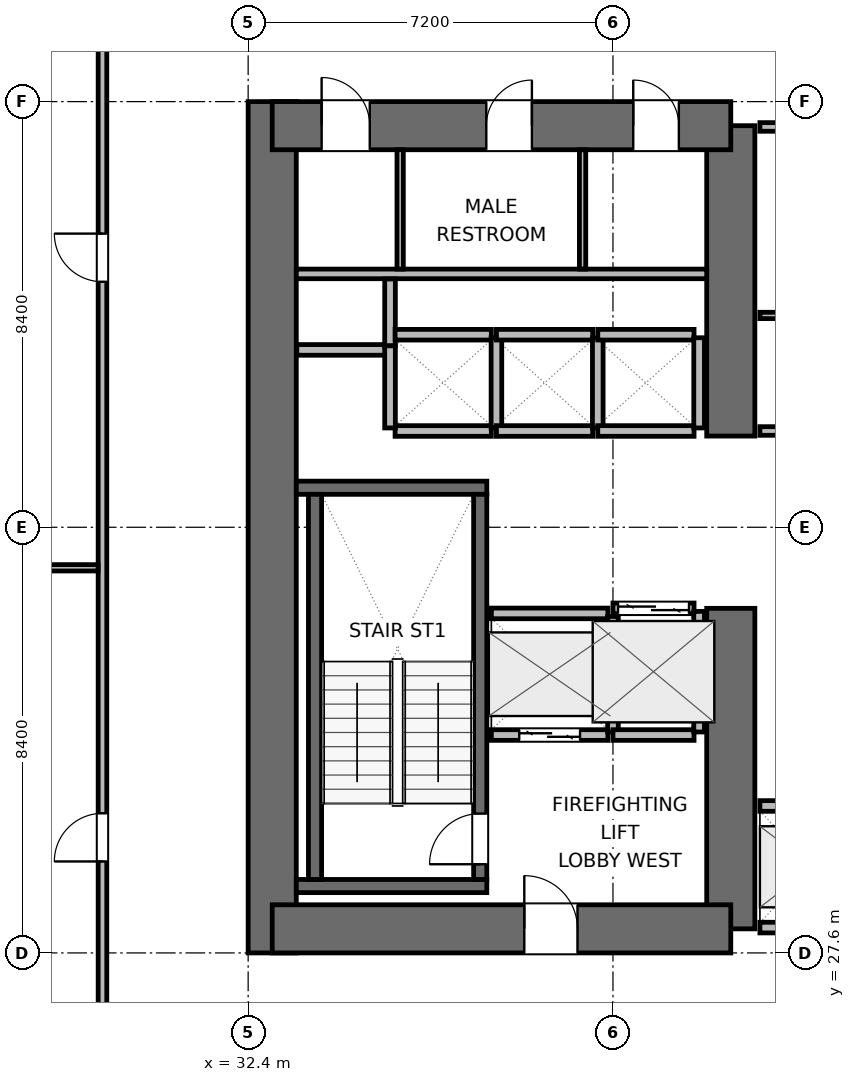
"""IFC4 building model, lengths in metres.
Left out: names, types, materials, properties, quantities, classifications, styles, units other than length and angle.
Written with IfcOpenShell. Run it as: python <this file> out.ifc"""

import sys

from ifc_helpers import new_model, si_unit, direction, frame, frame_2d, origin, place, context, subcontext, project, spatial, rectangle, extrude, element, fill, save


model = new_model("IFC4")
c1 = context("Model", 3, precision=1e-05, world=origin(), true_north=direction((0.0, 1.0)))
c2 = subcontext(c1, "Body", "Model", "MODEL_VIEW")
j1 = project(units=[si_unit("LENGTHUNIT", "METRE"), si_unit("PLANEANGLEUNIT", "RADIAN")], contexts=[c1])
p1 = place(None, origin())
s1 = spatial("IfcSite", under=j1, at=p1, CompositionType="ELEMENT")
p2 = place(p1, origin())
s2 = spatial("IfcBuilding", under=s1, at=p2, CompositionType="ELEMENT")
p3 = place(p2, frame((0.0, 0.0, 60.6)))
s3 = spatial("IfcBuildingStorey", under=s2, at=p3, CompositionType="ELEMENT", Elevation=60.6)
p4 = place(p3, frame((32.875, 27.6, 0.0), z_axis=(0.0, 0.0, 1.0), x_axis=(0.0, 1.0, 0.0)))
e1 = element("IfcWall", 1, at=p4, inside=s3, PredefinedType="SHEAR", context=c2, shape_type="SweptSolid", body=[
    extrude(rectangle(XDim=16.8, YDim=0.95, at=frame_2d((8.4, 0.0))), origin(), (0.0, 0.0, 1.0), 3.9),
])
p5 = place(p3, frame((41.925, 28.075, 0.0), z_axis=(0.0, 0.0, 1.0), x_axis=(0.0, 1.0, 0.0)))
e2 = element("IfcWall", 2, at=p5, inside=s3, PredefinedType="SHEAR", context=c2, shape_type="SweptSolid", body=[
    extrude(rectangle(XDim=6.325, YDim=0.95, at=frame_2d((3.163, 0.0))), origin(), (0.0, 0.0, 1.0), 3.9),
])
p6 = place(p3, frame((41.925, 37.8, 0.0), z_axis=(0.0, 0.0, 1.0), x_axis=(0.0, 1.0, 0.0)))
e3 = element("IfcWall", 3, at=p6, inside=s3, PredefinedType="SHEAR", context=c2, shape_type="SweptSolid", body=[
    extrude(rectangle(XDim=6.125, YDim=0.95, at=frame_2d((3.062, 0.0))), origin(), (0.0, 0.0, 1.0), 3.9),
])
p7 = place(p3, frame((32.875, 28.075, 0.0), z_axis=(0.0, 0.0, 1.0), x_axis=(1.0, 0.0, 0.0)))
e4 = element("IfcWall", 4, at=p7, inside=s3, PredefinedType="SHEAR", context=c2, shape_type="SweptSolid", body=[
    extrude(rectangle(XDim=9.05, YDim=0.95, at=frame_2d((4.525, 0.0))), origin(), (0.0, 0.0, 1.0), 3.9),
])
p8 = place(p7, frame((4.975, 0.0, 0.0)))
e5 = element("IfcOpeningElement", 5, at=p8, cuts=e4, PredefinedType="OPENING", context=c2, shape_type="SweptSolid", body=[
    extrude(rectangle(XDim=1.05, YDim=2.04, at=frame_2d((0.525, 1.02))), frame((0.0, 0.485, 0.0), z_axis=(0.0, -1.0, 0.0), x_axis=(1.0, 0.0, 0.0)), (0.0, 0.0, 1.0), 0.97),
])
p9 = place(p3, frame((32.875, 43.925, 0.0), z_axis=(0.0, 0.0, 1.0), x_axis=(1.0, 0.0, 0.0)))
e6 = element("IfcWall", 6, at=p9, inside=s3, PredefinedType="SHEAR", context=c2, shape_type="SweptSolid", body=[
    extrude(rectangle(XDim=9.05, YDim=0.95, at=frame_2d((4.525, 0.0))), origin(), (0.0, 0.0, 1.0), 3.9),
])
p10 = place(p9, frame((0.975, 0.0, 0.0)))
e7 = element("IfcOpeningElement", 7, at=p10, cuts=e6, PredefinedType="OPENING", context=c2, shape_type="SweptSolid", body=[
    extrude(rectangle(XDim=0.95, YDim=2.04, at=frame_2d((0.475, 1.02))), frame((0.0, 0.485, 0.0), z_axis=(0.0, -1.0, 0.0), x_axis=(1.0, 0.0, 0.0)), (0.0, 0.0, 1.0), 0.97),
])
p11 = place(p9, frame((4.225, 0.0, 0.0)))
e8 = element("IfcOpeningElement", 8, at=p11, cuts=e6, PredefinedType="OPENING", context=c2, shape_type="SweptSolid", body=[
    extrude(rectangle(XDim=0.9, YDim=2.02, at=frame_2d((0.45, 1.01))), frame((0.0, 0.485, 0.0), z_axis=(0.0, -1.0, 0.0), x_axis=(1.0, 0.0, 0.0)), (0.0, 0.0, 1.0), 0.97),
])
p12 = place(p9, frame((7.125, 0.0, 0.0)))
e9 = element("IfcOpeningElement", 9, at=p12, cuts=e6, PredefinedType="OPENING", context=c2, shape_type="SweptSolid", body=[
    extrude(rectangle(XDim=0.9, YDim=2.02, at=frame_2d((0.45, 1.01))), frame((0.0, 0.485, 0.0), z_axis=(0.0, -1.0, 0.0), x_axis=(1.0, 0.0, 0.0)), (0.0, 0.0, 1.0), 0.97),
])
for number, where, z_axis, x_axis in (
    (10, (33.35, 28.92, 0.0), (0.0, 0.0, 1.0), (1.0, 0.0, 0.0)),
    (11, (33.35, 36.78, 0.0), (0.0, 0.0, 1.0), (1.0, 0.0, 0.0)),
):
    element("IfcWall", number, at=place(p3, frame(where, z_axis=z_axis, x_axis=x_axis)), inside=s3, PredefinedType="SHEAR", context=c2, shape_type="SweptSolid", body=[
        extrude(rectangle(XDim=3.76, YDim=0.26, at=frame_2d((1.88, 0.0))), origin(), (0.0, 0.0, 1.0), 3.9),
    ])
p13 = place(p3, frame((33.72, 29.05, 0.0), z_axis=(0.0, 0.0, 1.0), x_axis=(0.0, 1.0, 0.0)))
e12 = element("IfcWall", 12, at=p13, inside=s3, PredefinedType="SHEAR", context=c2, shape_type="SweptSolid", body=[
    extrude(rectangle(XDim=7.6, YDim=0.26, at=frame_2d((3.8, 0.0))), origin(), (0.0, 0.0, 1.0), 3.9),
])
p14 = place(p3, frame((36.98, 29.05, 0.0), z_axis=(0.0, 0.0, 1.0), x_axis=(0.0, 1.0, 0.0)))
e13 = element("IfcWall", 13, at=p14, inside=s3, PredefinedType="SHEAR", context=c2, shape_type="SweptSolid", body=[
    extrude(rectangle(XDim=7.6, YDim=0.26, at=frame_2d((3.8, 0.0))), origin(), (0.0, 0.0, 1.0), 3.9),
])
p15 = place(p14, frame((0.3, 0.0, 0.0)))
e14 = element("IfcOpeningElement", 14, at=p15, cuts=e13, PredefinedType="OPENING", context=c2, shape_type="SweptSolid", body=[
    extrude(rectangle(XDim=1.0, YDim=2.04, at=frame_2d((0.5, 1.02))), frame((0.0, 0.14, 0.0), z_axis=(0.0, -1.0, 0.0), x_axis=(1.0, 0.0, 0.0)), (0.0, 0.0, 1.0), 0.28),
])
p16 = place(p3, frame((33.35, 41.0, 0.0), z_axis=(0.0, 0.0, 1.0), x_axis=(1.0, 0.0, 0.0)))
e15 = element("IfcWall", 15, at=p16, inside=s3, PredefinedType="PLUMBINGWALL", context=c2, shape_type="SweptSolid", body=[
    extrude(rectangle(XDim=8.1, YDim=0.19, at=frame_2d((4.05, 0.0))), origin(), (0.0, 0.0, 1.0), 3.64),
])
for number, where, z_axis, x_axis in (
    (16, (35.4, 41.095, 0.0), (0.0, 0.0, 1.0), (0.0, 1.0, 0.0)),
    (17, (39.0, 41.095, 0.0), (0.0, 0.0, 1.0), (0.0, 1.0, 0.0)),
):
    element("IfcWall", number, at=place(p3, frame(where, z_axis=z_axis, x_axis=x_axis)), inside=s3, PredefinedType="PARTITIONING", context=c2, shape_type="SweptSolid", body=[
        extrude(rectangle(XDim=2.355, YDim=0.125, at=frame_2d((1.177, 0.0))), origin(), (0.0, 0.0, 1.0), 3.64),
    ])
p17 = place(p3, frame((33.36, 39.5, 0.0), z_axis=(0.0, 0.0, 1.0), x_axis=(1.0, 0.0, 0.0)))
e18 = element("IfcWall", 18, at=p17, inside=s3, PredefinedType="PARTITIONING", context=c2, shape_type="SweptSolid", body=[
    extrude(rectangle(XDim=1.86, YDim=0.21, at=frame_2d((0.93, 0.0))), origin(), (0.0, 0.0, 1.0), 3.64),
])
p18 = place(p3, frame((35.2, 39.58, 0.0), z_axis=(0.0, 0.0, 1.0), x_axis=(0.0, 1.0, 0.0)))
e19 = element("IfcWall", 19, at=p18, inside=s3, PredefinedType="PARTITIONING", context=c2, shape_type="SweptSolid", body=[
    extrude(rectangle(XDim=1.32, YDim=0.21, at=frame_2d((0.66, 0.0))), origin(), (0.0, 0.0, 1.0), 3.64),
])
p19 = place(p3, frame((37.2, 31.9, 0.0), z_axis=(0.0, 0.0, 1.0), x_axis=(1.0, 0.0, 0.0)))
e20 = element("IfcWall", 20, at=p19, inside=s3, PredefinedType="PARTITIONING", context=c2, shape_type="SweptSolid", body=[
    extrude(rectangle(XDim=2.3, YDim=0.21, at=frame_2d((1.15, 0.0))), origin(), (0.0, 0.0, 1.0), 3.64),
])
p20 = place(p19, frame((0.55, 0.0, 0.0)))
e21 = element("IfcOpeningElement", 21, at=p20, cuts=e20, PredefinedType="OPENING", context=c2, shape_type="SweptSolid", body=[
    extrude(rectangle(XDim=1.2, YDim=2.04, at=frame_2d((0.6, 1.02))), frame((0.0, 0.115, 0.0), z_axis=(0.0, -1.0, 0.0), x_axis=(1.0, 0.0, 0.0)), (0.0, 0.0, 1.0), 0.23),
])
p21 = place(p3, frame((37.2, 34.3, 0.0), z_axis=(0.0, 0.0, 1.0), x_axis=(1.0, 0.0, 0.0)))
e22 = element("IfcWall", 22, at=p21, inside=s3, PredefinedType="PARTITIONING", context=c2, shape_type="SweptSolid", body=[
    extrude(rectangle(XDim=2.3, YDim=0.21, at=frame_2d((1.15, 0.0))), origin(), (0.0, 0.0, 1.0), 3.64),
])
p22 = place(p3, frame((39.6, 31.96, 0.0), z_axis=(0.0, 0.0, 1.0), x_axis=(0.0, 1.0, 0.0)))
e23 = element("IfcWall", 23, at=p22, inside=s3, PredefinedType="PARTITIONING", context=c2, shape_type="SweptSolid", body=[
    extrude(rectangle(XDim=2.28, YDim=0.21, at=frame_2d((1.14, 0.0))), origin(), (0.0, 0.0, 1.0), 3.64),
])
p23 = place(p3, frame((39.6, 34.4, 0.0), z_axis=(0.0, 0.0, 1.0), x_axis=(1.0, 0.0, 0.0)))
e24 = element("IfcWall", 24, at=p23, inside=s3, PredefinedType="PARTITIONING", context=c2, shape_type="SweptSolid", body=[
    extrude(rectangle(XDim=1.6, YDim=0.21, at=frame_2d((0.8, 0.0))), origin(), (0.0, 0.0, 1.0), 3.64),
])
p24 = place(p23, frame((0.1, 0.0, 0.0)))
e25 = element("IfcOpeningElement", 25, at=p24, cuts=e24, PredefinedType="OPENING", context=c2, shape_type="SweptSolid", body=[
    extrude(rectangle(XDim=1.4, YDim=2.06, at=frame_2d((0.7, 1.03))), frame((0.0, 0.115, 0.0), z_axis=(0.0, -1.0, 0.0), x_axis=(1.0, 0.0, 0.0)), (0.0, 0.0, 1.0), 0.23),
])
p25 = place(p3, frame((39.6, 31.9, 0.0), z_axis=(0.0, 0.0, 1.0), x_axis=(1.0, 0.0, 0.0)))
e26 = element("IfcWall", 26, at=p25, inside=s3, PredefinedType="PARTITIONING", context=c2, shape_type="SweptSolid", body=[
    extrude(rectangle(XDim=1.6, YDim=0.21, at=frame_2d((0.8, 0.0))), origin(), (0.0, 0.0, 1.0), 3.64),
])
p26 = place(p3, frame((41.3, 31.96, 0.0), z_axis=(0.0, 0.0, 1.0), x_axis=(0.0, 1.0, 0.0)))
e27 = element("IfcWall", 27, at=p26, inside=s3, PredefinedType="PARTITIONING", context=c2, shape_type="SweptSolid", body=[
    extrude(rectangle(XDim=2.38, YDim=0.21, at=frame_2d((1.19, 0.0))), origin(), (0.0, 0.0, 1.0), 3.64),
])
p27 = place(p3, frame((42.5, 30.5, 0.0), z_axis=(0.0, 0.0, 1.0), x_axis=(1.0, 0.0, 0.0)))
e28 = element("IfcWall", 28, at=p27, inside=s3, PredefinedType="PARTITIONING", context=c2, shape_type="SweptSolid", body=[
    extrude(rectangle(XDim=2.1, YDim=0.21, at=frame_2d((1.05, 0.0))), origin(), (0.0, 0.0, 1.0), 3.64),
])
p28 = place(p27, frame((0.5, 0.0, 0.0)))
e29 = element("IfcOpeningElement", 29, at=p28, cuts=e28, PredefinedType="OPENING", context=c2, shape_type="SweptSolid", body=[
    extrude(rectangle(XDim=1.1, YDim=2.04, at=frame_2d((0.55, 1.02))), frame((0.0, 0.115, 0.0), z_axis=(0.0, -1.0, 0.0), x_axis=(1.0, 0.0, 0.0)), (0.0, 0.0, 1.0), 0.23),
])
p29 = place(p3, frame((42.5, 28.1, 0.0), z_axis=(0.0, 0.0, 1.0), x_axis=(1.0, 0.0, 0.0)))
e30 = element("IfcWall", 30, at=p29, inside=s3, PredefinedType="PARTITIONING", context=c2, shape_type="SweptSolid", body=[
    extrude(rectangle(XDim=2.1, YDim=0.21, at=frame_2d((1.05, 0.0))), origin(), (0.0, 0.0, 1.0), 2.525),
])
for number, where, z_axis, x_axis in (
    (31, (35.3, 37.9, 0.0), (0.0, 0.0, 1.0), (1.0, 0.0, 0.0)),
    (32, (35.3, 39.8, 0.0), (0.0, 0.0, 1.0), (1.0, 0.0, 0.0)),
):
    element("IfcWall", number, at=place(p3, frame(where, z_axis=z_axis, x_axis=x_axis)), inside=s3, PredefinedType="PARTITIONING", context=c2, shape_type="SweptSolid", body=[
        extrude(rectangle(XDim=1.9, YDim=0.21, at=frame_2d((0.95, 0.0))), origin(), (0.0, 0.0, 1.0), 3.64),
    ])
p30 = place(p3, frame((35.2, 37.96, 0.0), z_axis=(0.0, 0.0, 1.0), x_axis=(0.0, 1.0, 0.0)))
e33 = element("IfcWall", 33, at=p30, inside=s3, PredefinedType="PARTITIONING", context=c2, shape_type="SweptSolid", body=[
    extrude(rectangle(XDim=1.62, YDim=0.21, at=frame_2d((0.81, 0.0))), origin(), (0.0, 0.0, 1.0), 3.64),
])
p31 = place(p3, frame((37.3, 37.96, 0.0), z_axis=(0.0, 0.0, 1.0), x_axis=(0.0, 1.0, 0.0)))
e34 = element("IfcWall", 34, at=p31, inside=s3, PredefinedType="PARTITIONING", context=c2, shape_type="SweptSolid", body=[
    extrude(rectangle(XDim=1.78, YDim=0.21, at=frame_2d((0.89, 0.0))), origin(), (0.0, 0.0, 1.0), 3.64),
])
for number, where, z_axis, x_axis in (
    (35, (37.3, 37.9, 0.0), (0.0, 0.0, 1.0), (1.0, 0.0, 0.0)),
    (36, (37.3, 39.8, 0.0), (0.0, 0.0, 1.0), (1.0, 0.0, 0.0)),
):
    element("IfcWall", number, at=place(p3, frame(where, z_axis=z_axis, x_axis=x_axis)), inside=s3, PredefinedType="PARTITIONING", context=c2, shape_type="SweptSolid", body=[
        extrude(rectangle(XDim=1.9, YDim=0.21, at=frame_2d((0.95, 0.0))), origin(), (0.0, 0.0, 1.0), 3.64),
    ])
p32 = place(p3, frame((39.3, 37.96, 0.0), z_axis=(0.0, 0.0, 1.0), x_axis=(0.0, 1.0, 0.0)))
e37 = element("IfcWall", 37, at=p32, inside=s3, PredefinedType="PARTITIONING", context=c2, shape_type="SweptSolid", body=[
    extrude(rectangle(XDim=1.78, YDim=0.21, at=frame_2d((0.89, 0.0))), origin(), (0.0, 0.0, 1.0), 3.64),
])
for number, where, z_axis, x_axis in (
    (38, (39.3, 37.9, 0.0), (0.0, 0.0, 1.0), (1.0, 0.0, 0.0)),
    (39, (39.3, 39.8, 0.0), (0.0, 0.0, 1.0), (1.0, 0.0, 0.0)),
):
    element("IfcWall", number, at=place(p3, frame(where, z_axis=z_axis, x_axis=x_axis)), inside=s3, PredefinedType="PARTITIONING", context=c2, shape_type="SweptSolid", body=[
        extrude(rectangle(XDim=1.9, YDim=0.21, at=frame_2d((0.95, 0.0))), origin(), (0.0, 0.0, 1.0), 3.64),
    ])
p33 = place(p3, frame((41.3, 37.96, 0.0), z_axis=(0.0, 0.0, 1.0), x_axis=(0.0, 1.0, 0.0)))
e40 = element("IfcWall", 40, at=p33, inside=s3, PredefinedType="PARTITIONING", context=c2, shape_type="SweptSolid", body=[
    extrude(rectangle(XDim=1.78, YDim=0.21, at=frame_2d((0.89, 0.0))), origin(), (0.0, 0.0, 1.0), 3.64),
])
p34 = place(p3, frame((42.5, 37.9, 0.0), z_axis=(0.0, 0.0, 1.0), x_axis=(1.0, 0.0, 0.0)))
e41 = element("IfcWall", 41, at=p34, inside=s3, PredefinedType="PARTITIONING", context=c2, shape_type="SweptSolid", body=[
    extrude(rectangle(XDim=4.213, YDim=0.17, at=frame_2d((2.106, 0.0))), origin(), (0.0, 0.0, 1.0), 3.64),
])
p35 = place(p3, frame((42.5, 43.9, 0.0), z_axis=(0.0, 0.0, 1.0), x_axis=(1.0, 0.0, 0.0)))
e42 = element("IfcWall", 42, at=p35, inside=s3, PredefinedType="PARTITIONING", context=c2, shape_type="SweptSolid", body=[
    extrude(rectangle(XDim=4.213, YDim=0.17, at=frame_2d((2.106, 0.0))), origin(), (0.0, 0.0, 1.0), 2.525),
])
p36 = place(p3, frame((42.5, 40.18, 0.0), z_axis=(0.0, 0.0, 1.0), x_axis=(1.0, 0.0, 0.0)))
e43 = element("IfcWall", 43, at=p36, inside=s3, PredefinedType="PARTITIONING", context=c2, shape_type="SweptSolid", body=[
    extrude(rectangle(XDim=4.213, YDim=0.125, at=frame_2d((2.106, 0.0))), origin(), (0.0, 0.0, 1.0), 3.64),
])
p37 = place(p3, frame((29.525, 24.647, 0.0), z_axis=(0.0, 0.0, 1.0), x_axis=(0.0, 1.0, 0.0)))
e44 = element("IfcWall", 44, at=p37, inside=s3, PredefinedType="PARTITIONING", context=c2, shape_type="SweptSolid", body=[
    extrude(rectangle(XDim=22.706, YDim=0.17, at=frame_2d((11.353, 0.0))), origin(), (0.0, 0.0, 1.0), 3.64),
])
p38 = place(p37, frame((4.758, 0.0, 0.0)))
e45 = element("IfcOpeningElement", 45, at=p38, cuts=e44, PredefinedType="OPENING", context=c2, shape_type="SweptSolid", body=[
    extrude(rectangle(XDim=0.95, YDim=2.04, at=frame_2d((0.475, 1.02))), frame((0.0, 0.095, 0.0), z_axis=(0.0, -1.0, 0.0), x_axis=(1.0, 0.0, 0.0)), (0.0, 0.0, 1.0), 0.19),
])
p39 = place(p37, frame((16.198, 0.0, 0.0)))
e46 = element("IfcOpeningElement", 46, at=p39, cuts=e44, PredefinedType="OPENING", context=c2, shape_type="SweptSolid", body=[
    extrude(rectangle(XDim=0.95, YDim=2.04, at=frame_2d((0.475, 1.02))), frame((0.0, 0.095, 0.0), z_axis=(0.0, -1.0, 0.0), x_axis=(1.0, 0.0, 0.0)), (0.0, 0.0, 1.0), 0.19),
])
p40 = place(p3, frame((18.245, 35.2, 0.0), z_axis=(0.0, 0.0, 1.0), x_axis=(1.0, 0.0, 0.0)))
e47 = element("IfcWall", 47, at=p40, inside=s3, PredefinedType="PARTITIONING", context=c2, shape_type="SweptSolid", body=[
    extrude(rectangle(XDim=11.193, YDim=0.125, at=frame_2d((5.596, 0.0))), origin(), (0.0, 0.0, 1.0), 3.64),
])
p41 = place(p15, origin())
e48 = element("IfcDoor", 48, at=p41, inside=s3, OperationType="SINGLE_SWING_LEFT", PredefinedType="DOOR", context=c2, shape_type="SweptSolid", body=[
    extrude(rectangle(XDim=1.0, YDim=2.04, at=frame_2d((0.5, 1.02))), frame((0.0, 0.025, 0.0), z_axis=(0.0, -1.0, 0.0), x_axis=(1.0, 0.0, 0.0)), (0.0, 0.0, 1.0), 0.05),
])
fill(e14, e48)
p42 = place(p20, origin())
e49 = element("IfcDoor", 49, at=p42, inside=s3, OperationType="DOUBLE_DOOR_SLIDING", PredefinedType="DOOR", context=c2, shape_type="SweptSolid", body=[
    extrude(rectangle(XDim=1.2, YDim=2.04, at=frame_2d((0.6, 1.02))), frame((0.0, 0.025, 0.0), z_axis=(0.0, -1.0, 0.0), x_axis=(1.0, 0.0, 0.0)), (0.0, 0.0, 1.0), 0.05),
])
fill(e21, e49)
p43 = place(p24, origin())
e50 = element("IfcDoor", 50, at=p43, inside=s3, OperationType="DOUBLE_DOOR_SLIDING", PredefinedType="DOOR", context=c2, shape_type="SweptSolid", body=[
    extrude(rectangle(XDim=1.4, YDim=2.06, at=frame_2d((0.7, 1.03))), frame((0.0, 0.025, 0.0), z_axis=(0.0, -1.0, 0.0), x_axis=(1.0, 0.0, 0.0)), (0.0, 0.0, 1.0), 0.05),
])
fill(e25, e50)
p44 = place(p8, origin())
e51 = element("IfcDoor", 51, at=p44, inside=s3, OperationType="SINGLE_SWING_LEFT", PredefinedType="DOOR", context=c2, shape_type="SweptSolid", body=[
    extrude(rectangle(XDim=1.05, YDim=2.04, at=frame_2d((0.525, 1.02))), frame((0.0, 0.025, 0.0), z_axis=(0.0, -1.0, 0.0), x_axis=(1.0, 0.0, 0.0)), (0.0, 0.0, 1.0), 0.05),
])
fill(e5, e51)
p45 = place(p10, origin())
e52 = element("IfcDoor", 52, at=p45, inside=s3, OperationType="SINGLE_SWING_LEFT", PredefinedType="DOOR", context=c2, shape_type="SweptSolid", body=[
    extrude(rectangle(XDim=0.95, YDim=2.04, at=frame_2d((0.475, 1.02))), frame((0.0, 0.025, 0.0), z_axis=(0.0, -1.0, 0.0), x_axis=(1.0, 0.0, 0.0)), (0.0, 0.0, 1.0), 0.05),
])
fill(e7, e52)
p46 = place(p11, origin())
e53 = element("IfcDoor", 53, at=p46, inside=s3, OperationType="SINGLE_SWING_RIGHT", PredefinedType="DOOR", context=c2, shape_type="SweptSolid", body=[
    extrude(rectangle(XDim=0.9, YDim=2.02, at=frame_2d((0.45, 1.01))), frame((0.0, 0.025, 0.0), z_axis=(0.0, -1.0, 0.0), x_axis=(1.0, 0.0, 0.0)), (0.0, 0.0, 1.0), 0.05),
])
fill(e8, e53)
p47 = place(p12, origin())
e54 = element("IfcDoor", 54, at=p47, inside=s3, OperationType="SINGLE_SWING_LEFT", PredefinedType="DOOR", context=c2, shape_type="SweptSolid", body=[
    extrude(rectangle(XDim=0.9, YDim=2.02, at=frame_2d((0.45, 1.01))), frame((0.0, 0.025, 0.0), z_axis=(0.0, -1.0, 0.0), x_axis=(1.0, 0.0, 0.0)), (0.0, 0.0, 1.0), 0.05),
])
fill(e9, e54)
p48 = place(p38, origin())
e55 = element("IfcDoor", 55, at=p48, inside=s3, OperationType="SINGLE_SWING_LEFT", PredefinedType="DOOR", context=c2, shape_type="SweptSolid", body=[
    extrude(rectangle(XDim=0.95, YDim=2.04, at=frame_2d((0.475, 1.02))), frame((0.0, 0.025, 0.0), z_axis=(0.0, -1.0, 0.0), x_axis=(1.0, 0.0, 0.0)), (0.0, 0.0, 1.0), 0.05),
])
fill(e45, e55)
p49 = place(p39, origin())
e56 = element("IfcDoor", 56, at=p49, inside=s3, OperationType="SINGLE_SWING_RIGHT", PredefinedType="DOOR", context=c2, shape_type="SweptSolid", body=[
    extrude(rectangle(XDim=0.95, YDim=2.04, at=frame_2d((0.475, 1.02))), frame((0.0, 0.025, 0.0), z_axis=(0.0, -1.0, 0.0), x_axis=(1.0, 0.0, 0.0)), (0.0, 0.0, 1.0), 0.05),
])
fill(e46, e56)
save(model, sys.argv[1])
